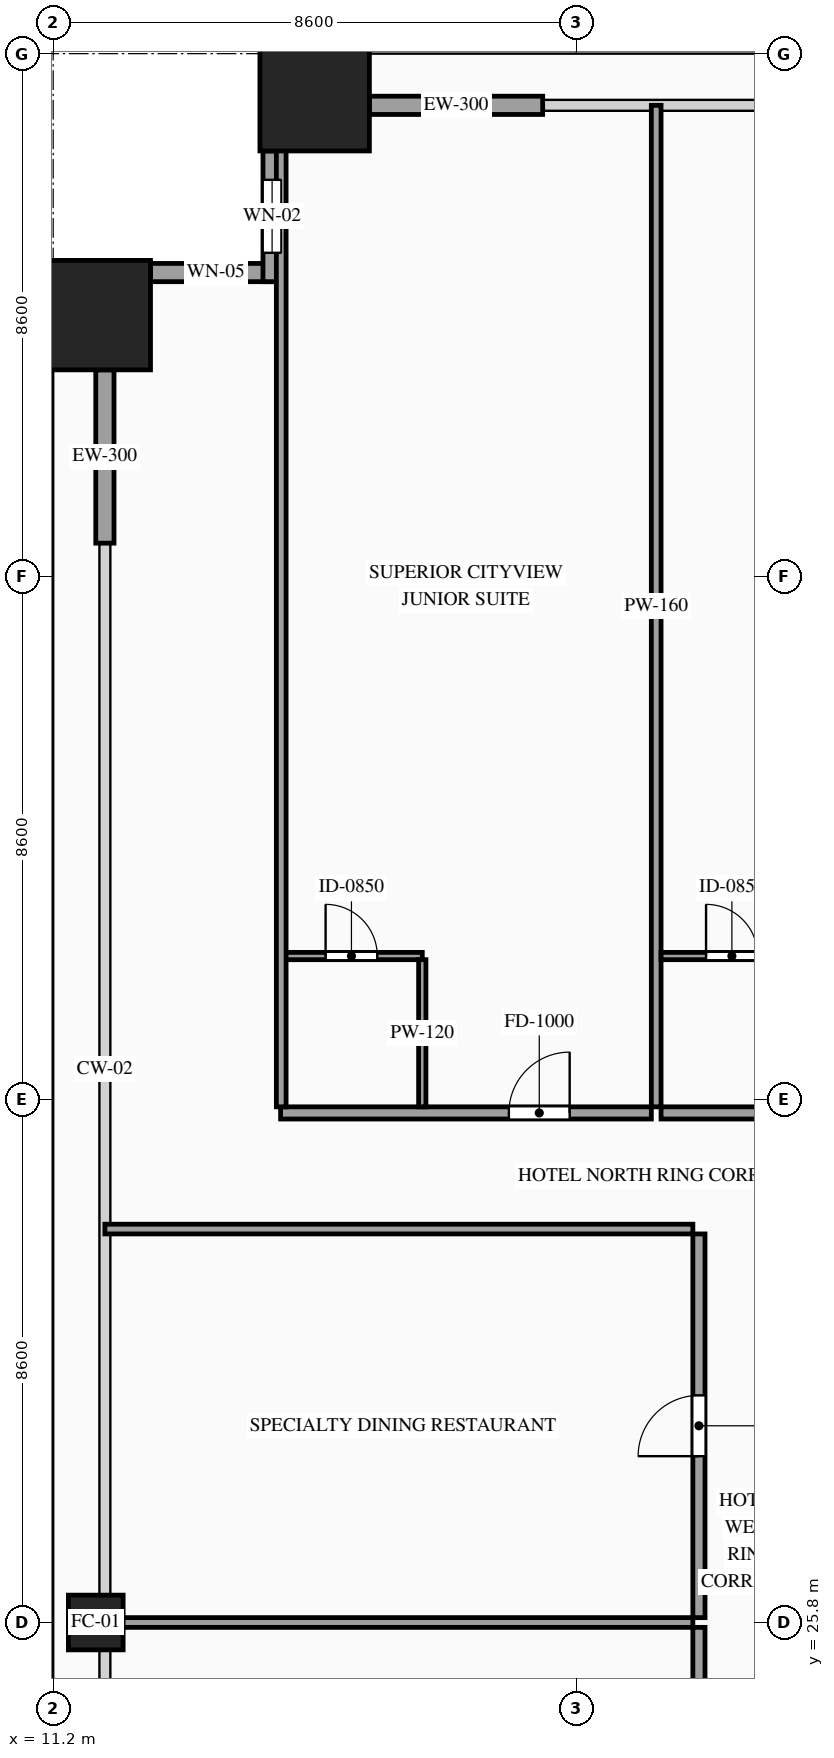
"""IFC4 building model, lengths in metres.
Left out: names, types, materials, properties, quantities, classifications, styles, units other than length and angle.
Written with IfcOpenShell. Run it as: python <this file> out.ifc"""

import sys

from ifc_helpers import new_model, si_unit, direction, frame, frame_2d, origin, origin_2d, place, context, subcontext, project, spatial, rectangle, hollow_rectangle, extrude, source, transform, mapped, element, fill, save


model = new_model("IFC4")
c1 = context("Model", 3, precision=1e-05, world=origin(), true_north=direction((0.0, 1.0)))
c2 = subcontext(c1, "Body", "Model", "MODEL_VIEW")
j1 = project(units=[si_unit("LENGTHUNIT", "METRE"), si_unit("PLANEANGLEUNIT", "RADIAN")], contexts=[c1])
p1 = place(None, origin())
s1 = spatial("IfcSite", under=j1, at=p1, CompositionType="ELEMENT")
p2 = place(p1, origin())
s2 = spatial("IfcBuilding", under=s1, at=p2, CompositionType="ELEMENT")
p3 = place(p2, frame((0.0, 0.0, 67.6)))
s3 = spatial("IfcBuildingStorey", under=s2, at=p3, CompositionType="ELEMENT", Elevation=67.6)
m1 = source(origin(), c2, "Body", "SweptSolid", [
    extrude(hollow_rectangle(XDim=1.8, YDim=1.8, WallThickness=0.08, at=origin_2d()), origin(), (0.0, 0.0, 1.0), 3.6),
])
p4 = place(p3, frame((15.5, 50.9, 0.0), z_axis=(0.0, 0.0, 1.0), x_axis=(1.0, 0.0, 0.0)))
e1 = element("IfcColumn", 1, at=p4, inside=s3, PredefinedType="COLUMN", context=c2, shape_type="MappedRepresentation", body=[
    mapped(m1, transform((0.0, 0.0, 0.0), scale=1.0)),
])
m2 = source(origin(), c2, "Body", "SweptSolid", [
    extrude(hollow_rectangle(XDim=0.9, YDim=0.9, WallThickness=0.042, at=origin_2d()), origin(), (0.0, 0.0, 1.0), 3.6),
])
p5 = place(p3, frame((11.9, 25.8, 0.0), z_axis=(0.0, 0.0, 1.0), x_axis=(1.0, 0.0, 0.0)))
e2 = element("IfcColumn", 2, at=p5, inside=s3, PredefinedType="COLUMN", context=c2, shape_type="MappedRepresentation", body=[
    mapped(m2, transform((0.0, 0.0, 0.0), scale=1.0)),
])
p6 = place(p3, frame((11.9, 47.3, 0.0), z_axis=(0.0, 0.0, 1.0), x_axis=(1.0, 0.0, 0.0)))
e3 = element("IfcColumn", 3, at=p6, inside=s3, PredefinedType="COLUMN", context=c2, shape_type="MappedRepresentation", body=[
    mapped(m1, transform((0.0, 0.0, 0.0), scale=1.0)),
])
p7 = place(p3, frame((14.95, 48.0, 0.0), z_axis=(0.0, 0.0, 1.0), x_axis=(-1.0, 0.0, 0.0)))
e4 = element("IfcWall", 4, at=p7, inside=s3, PredefinedType="SOLIDWALL", context=c2, shape_type="SweptSolid", body=[
    extrude(rectangle(XDim=2.15, YDim=0.3, at=frame_2d((1.075, 0.0))), origin(), (0.0, 0.0, 1.0), 3.38),
])
p8 = place(p7, frame((0.625, 0.0, 0.85)))
e5 = element("IfcOpeningElement", 5, at=p8, cuts=e4, PredefinedType="OPENING", context=c2, shape_type="SweptSolid", body=[
    extrude(rectangle(XDim=0.9, YDim=1.5, at=frame_2d((0.45, 0.75))), frame((0.0, 0.165, 0.0), z_axis=(0.0, -1.0, 0.0), x_axis=(1.0, 0.0, 0.0)), (0.0, 0.0, 1.0), 0.33),
])
p9 = place(p3, frame((14.8, 50.0, 0.0), z_axis=(0.0, 0.0, 1.0), x_axis=(0.0, -1.0, 0.0)))
e6 = element("IfcWall", 6, at=p9, inside=s3, PredefinedType="SOLIDWALL", context=c2, shape_type="SweptSolid", body=[
    extrude(rectangle(XDim=2.15, YDim=0.3, at=frame_2d((1.075, 0.0))), origin(), (0.0, 0.0, 1.0), 3.38),
])
p10 = place(p9, frame((0.475, 0.0, 0.85)))
e7 = element("IfcOpeningElement", 7, at=p10, cuts=e6, PredefinedType="OPENING", context=c2, shape_type="SweptSolid", body=[
    extrude(rectangle(XDim=1.2, YDim=2.1, at=frame_2d((0.6, 1.05))), frame((0.0, 0.165, 0.0), z_axis=(0.0, -1.0, 0.0), x_axis=(1.0, 0.0, 0.0)), (0.0, 0.0, 1.0), 0.33),
])
m3 = source(origin(), c2, "Body", "SweptSolid", [
    extrude(rectangle(XDim=2.85, YDim=0.3, at=frame_2d((1.425, 0.0))), origin(), (0.0, 0.0, 1.0), 2.775),
])
p11 = place(p3, frame((16.4, 50.75, 0.0), z_axis=(0.0, 0.0, 1.0), x_axis=(1.0, 0.0, 0.0)))
e8 = element("IfcWall", 8, at=p11, inside=s3, PredefinedType="SOLIDWALL", context=c2, shape_type="MappedRepresentation", body=[
    mapped(m3, transform((0.0, 0.0, 0.0), scale=1.0)),
])
m4 = source(origin(), c2, "Body", "SweptSolid", [
    extrude(rectangle(XDim=2.85, YDim=0.3, at=frame_2d((1.425, 0.0))), origin(), (0.0, 0.0, 1.0), 2.775),
])
p12 = place(p3, frame((12.05, 43.55, 0.0), z_axis=(0.0, 0.0, 1.0), x_axis=(0.0, 1.0, 0.0)))
e9 = element("IfcWall", 9, at=p12, inside=s3, PredefinedType="SOLIDWALL", context=c2, shape_type="MappedRepresentation", body=[
    mapped(m4, transform((0.0, 0.0, 0.0), scale=1.0)),
])
p13 = place(p3, frame((14.94, 34.18, 0.0), z_axis=(0.0, 0.0, 1.0), x_axis=(1.0, 0.0, 0.0)))
e10 = element("IfcWall", 10, at=p13, inside=s3, PredefinedType="PARTITIONING", context=c2, shape_type="SweptSolid", body=[
    extrude(rectangle(XDim=6.097, YDim=0.2, at=frame_2d((3.049, 0.0))), origin(), (0.0, 0.0, 1.0), 3.38),
])
p14 = place(p13, frame((3.754, 0.0, 0.0)))
e11 = element("IfcOpeningElement", 11, at=p14, cuts=e10, PredefinedType="OPENING", context=c2, shape_type="SweptSolid", body=[
    extrude(rectangle(XDim=1.0, YDim=2.2, at=frame_2d((0.5, 1.1))), frame((0.0, 0.115, 0.0), z_axis=(0.0, -1.0, 0.0), x_axis=(1.0, 0.0, 0.0)), (0.0, 0.0, 1.0), 0.23),
])
m5 = source(origin(), c2, "Body", "SweptSolid", [
    extrude(rectangle(XDim=16.47, YDim=0.16, at=frame_2d((8.235, 0.0))), origin(), (0.0, 0.0, 1.0), 3.38),
])
p15 = place(p3, frame((21.117, 34.28, 0.0), z_axis=(0.0, 0.0, 1.0), x_axis=(0.0, 1.0, 0.0)))
e12 = element("IfcWall", 12, at=p15, inside=s3, PredefinedType="PARTITIONING", context=c2, shape_type="MappedRepresentation", body=[
    mapped(m5, transform((0.0, 0.0, 0.0), scale=1.0)),
])
p16 = place(p3, frame((14.94, 36.76, 0.0), z_axis=(0.0, 0.0, 1.0), x_axis=(1.0, 0.0, 0.0)))
e13 = element("IfcWall", 13, at=p16, inside=s3, PredefinedType="PARTITIONING", context=c2, shape_type="SweptSolid", body=[
    extrude(rectangle(XDim=2.33, YDim=0.12, at=frame_2d((1.165, 0.0))), origin(), (0.0, 0.0, 1.0), 3.38),
])
p17 = place(p16, frame((0.74, 0.0, 0.0)))
e14 = element("IfcOpeningElement", 14, at=p17, cuts=e13, PredefinedType="OPENING", context=c2, shape_type="SweptSolid", body=[
    extrude(rectangle(XDim=0.85, YDim=2.1, at=frame_2d((0.425, 1.05))), frame((0.0, 0.075, 0.0), z_axis=(0.0, -1.0, 0.0), x_axis=(1.0, 0.0, 0.0)), (0.0, 0.0, 1.0), 0.15),
])
m6 = source(origin(), c2, "Body", "SweptSolid", [
    extrude(rectangle(XDim=2.42, YDim=0.12, at=frame_2d((1.21, 0.0))), origin(), (0.0, 0.0, 1.0), 3.38),
])
p18 = place(p3, frame((17.27, 34.28, 0.0), z_axis=(0.0, 0.0, 1.0), x_axis=(0.0, 1.0, 0.0)))
e15 = element("IfcWall", 15, at=p18, inside=s3, PredefinedType="PARTITIONING", context=c2, shape_type="MappedRepresentation", body=[
    mapped(m6, transform((0.0, 0.0, 0.0), scale=1.0)),
])
p19 = place(p3, frame((21.197, 34.18, 0.0), z_axis=(0.0, 0.0, 1.0), x_axis=(1.0, 0.0, 0.0)))
e16 = element("IfcWall", 16, at=p19, inside=s3, PredefinedType="PARTITIONING", context=c2, shape_type="SweptSolid", body=[
    extrude(rectangle(XDim=9.429, YDim=0.2, at=frame_2d((4.714, 0.0))), origin(), (0.0, 0.0, 1.0), 3.38),
])
p20 = place(p19, frame((5.42, 0.0, 0.0)))
e17 = element("IfcOpeningElement", 17, at=p20, cuts=e16, PredefinedType="OPENING", context=c2, shape_type="SweptSolid", body=[
    extrude(rectangle(XDim=1.0, YDim=2.2, at=frame_2d((0.5, 1.1))), frame((0.0, 0.115, 0.0), z_axis=(0.0, -1.0, 0.0), x_axis=(1.0, 0.0, 0.0)), (0.0, 0.0, 1.0), 0.23),
])
p21 = place(p3, frame((21.197, 36.76, 0.0), z_axis=(0.0, 0.0, 1.0), x_axis=(1.0, 0.0, 0.0)))
e18 = element("IfcWall", 18, at=p21, inside=s3, PredefinedType="PARTITIONING", context=c2, shape_type="SweptSolid", body=[
    extrude(rectangle(XDim=2.33, YDim=0.12, at=frame_2d((1.165, 0.0))), origin(), (0.0, 0.0, 1.0), 3.38),
])
p22 = place(p21, frame((0.74, 0.0, 0.0)))
e19 = element("IfcOpeningElement", 19, at=p22, cuts=e18, PredefinedType="OPENING", context=c2, shape_type="SweptSolid", body=[
    extrude(rectangle(XDim=0.85, YDim=2.1, at=frame_2d((0.425, 1.05))), frame((0.0, 0.075, 0.0), z_axis=(0.0, -1.0, 0.0), x_axis=(1.0, 0.0, 0.0)), (0.0, 0.0, 1.0), 0.15),
])
m7 = source(origin(), c2, "Body", "SweptSolid", [
    extrude(rectangle(XDim=16.32, YDim=0.16, at=frame_2d((8.16, 0.0))), origin(), (0.0, 0.0, 1.0), 3.38),
])
p23 = place(p3, frame((14.95, 34.28, 0.0), z_axis=(0.0, 0.0, 1.0), x_axis=(0.0, 1.0, 0.0)))
e20 = element("IfcWall", 20, at=p23, inside=s3, PredefinedType="PARTITIONING", context=c2, shape_type="MappedRepresentation", body=[
    mapped(m7, transform((0.0, 0.0, 0.0), scale=1.0)),
])
p24 = place(p3, frame((21.82, 19.41, 0.0), z_axis=(0.0, 0.0, 1.0), x_axis=(0.0, 1.0, 0.0)))
e21 = element("IfcWall", 21, at=p24, inside=s3, PredefinedType="PARTITIONING", context=c2, shape_type="SweptSolid", body=[
    extrude(rectangle(XDim=6.31, YDim=0.2, at=frame_2d((3.155, 0.0))), origin(), (0.0, 0.0, 1.0), 3.38),
])
p25 = place(p24, frame((2.655, 0.0, 0.0)))
e22 = element("IfcOpeningElement", 22, at=p25, cuts=e21, PredefinedType="OPENING", context=c2, shape_type="SweptSolid", body=[
    extrude(rectangle(XDim=1.0, YDim=2.2, at=frame_2d((0.5, 1.1))), frame((0.0, 0.115, 0.0), z_axis=(0.0, -1.0, 0.0), x_axis=(1.0, 0.0, 0.0)), (0.0, 0.0, 1.0), 0.23),
])
m8 = source(origin(), c2, "Body", "SweptSolid", [
    extrude(rectangle(XDim=9.67, YDim=0.16, at=frame_2d((4.835, 0.0))), origin(), (0.0, 0.0, 1.0), 2.575),
])
p26 = place(p3, frame((12.05, 25.8, 0.0), z_axis=(0.0, 0.0, 1.0), x_axis=(1.0, 0.0, 0.0)))
e23 = element("IfcWall", 23, at=p26, inside=s3, PredefinedType="PARTITIONING", context=c2, shape_type="MappedRepresentation", body=[
    mapped(m8, transform((0.0, 0.0, 0.0), scale=1.0)),
])
p27 = place(p3, frame((21.82, 25.88, 0.0), z_axis=(0.0, 0.0, 1.0), x_axis=(0.0, 1.0, 0.0)))
e24 = element("IfcWall", 24, at=p27, inside=s3, PredefinedType="PARTITIONING", context=c2, shape_type="SweptSolid", body=[
    extrude(rectangle(XDim=6.31, YDim=0.2, at=frame_2d((3.155, 0.0))), origin(), (0.0, 0.0, 1.0), 3.38),
])
p28 = place(p27, frame((2.655, 0.0, 0.0)))
e25 = element("IfcOpeningElement", 25, at=p28, cuts=e24, PredefinedType="OPENING", context=c2, shape_type="SweptSolid", body=[
    extrude(rectangle(XDim=1.0, YDim=2.2, at=frame_2d((0.5, 1.1))), frame((0.0, 0.115, 0.0), z_axis=(0.0, -1.0, 0.0), x_axis=(1.0, 0.0, 0.0)), (0.0, 0.0, 1.0), 0.23),
])
m9 = source(origin(), c2, "Body", "SweptSolid", [
    extrude(rectangle(XDim=9.67, YDim=0.16, at=frame_2d((4.835, 0.0))), origin(), (0.0, 0.0, 1.0), 2.875),
])
p29 = place(p3, frame((12.05, 32.27, 0.0), z_axis=(0.0, 0.0, 1.0), x_axis=(1.0, 0.0, 0.0)))
e26 = element("IfcWall", 26, at=p29, inside=s3, PredefinedType="PARTITIONING", context=c2, shape_type="MappedRepresentation", body=[
    mapped(m9, transform((0.0, 0.0, 0.0), scale=1.0)),
])
m10 = source(origin(), c2, "Body", "SweptSolid", [
    extrude(rectangle(XDim=0.9, YDim=1.5, at=frame_2d((0.45, 0.75))), frame((0.0, 0.03, 0.0), z_axis=(0.0, -1.0, 0.0), x_axis=(1.0, 0.0, 0.0)), (0.0, 0.0, 1.0), 0.06),
])
p30 = place(p8, origin())
e27 = element("IfcWindow", 27, at=p30, inside=s3, PartitioningType="SINGLE_PANEL", PredefinedType="WINDOW", context=c2, shape_type="MappedRepresentation", body=[
    mapped(m10, transform((0.0, 0.0, 0.0), scale=1.0)),
])
fill(e5, e27)
m11 = source(origin(), c2, "Body", "SweptSolid", [
    extrude(rectangle(XDim=1.2, YDim=2.1, at=frame_2d((0.6, 1.05))), frame((0.0, 0.03, 0.0), z_axis=(0.0, -1.0, 0.0), x_axis=(1.0, 0.0, 0.0)), (0.0, 0.0, 1.0), 0.06),
])
p31 = place(p10, origin())
e28 = element("IfcWindow", 28, at=p31, inside=s3, PartitioningType="SINGLE_PANEL", PredefinedType="WINDOW", context=c2, shape_type="MappedRepresentation", body=[
    mapped(m11, transform((0.0, 0.0, 0.0), scale=1.0)),
])
fill(e7, e28)
m12 = source(origin(), c2, "Body", "SweptSolid", [
    extrude(rectangle(XDim=1.0, YDim=2.2, at=frame_2d((0.5, 1.1))), frame((0.0, 0.025, 0.0), z_axis=(0.0, -1.0, 0.0), x_axis=(1.0, 0.0, 0.0)), (0.0, 0.0, 1.0), 0.05),
])
p32 = place(p14, origin())
e29 = element("IfcDoor", 29, at=p32, inside=s3, OperationType="SINGLE_SWING_RIGHT", PredefinedType="DOOR", context=c2, shape_type="MappedRepresentation", body=[
    mapped(m12, transform((0.0, 0.0, 0.0), scale=1.0)),
])
fill(e11, e29)
m13 = source(origin(), c2, "Body", "SweptSolid", [
    extrude(rectangle(XDim=0.85, YDim=2.1, at=frame_2d((0.425, 1.05))), frame((0.0, 0.025, 0.0), z_axis=(0.0, -1.0, 0.0), x_axis=(1.0, 0.0, 0.0)), (0.0, 0.0, 1.0), 0.05),
])
p33 = place(p17, origin())
e30 = element("IfcDoor", 30, at=p33, inside=s3, OperationType="SINGLE_SWING_LEFT", PredefinedType="DOOR", context=c2, shape_type="MappedRepresentation", body=[
    mapped(m13, transform((0.0, 0.0, 0.0), scale=1.0)),
])
fill(e14, e30)
p34 = place(p22, origin())
e31 = element("IfcDoor", 31, at=p34, inside=s3, OperationType="SINGLE_SWING_LEFT", PredefinedType="DOOR", context=c2, shape_type="MappedRepresentation", body=[
    mapped(m13, transform((0.0, 0.0, 0.0), scale=1.0)),
])
fill(e19, e31)
p35 = place(p28, origin())
e32 = element("IfcDoor", 32, at=p35, inside=s3, OperationType="SINGLE_SWING_LEFT", PredefinedType="DOOR", context=c2, shape_type="MappedRepresentation", body=[
    mapped(m12, transform((0.0, 0.0, 0.0), scale=1.0)),
])
fill(e25, e32)
save(model, sys.argv[1])
